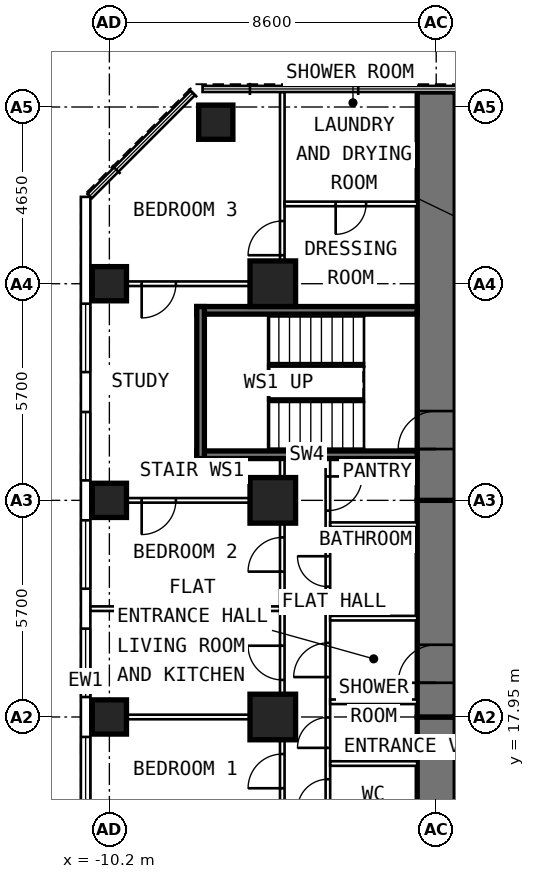
"""IFC4 building model, lengths in metres.
Left out: names, types, materials, properties, quantities, classifications, styles, units other than length and angle.
Written with IfcOpenShell. Run it as: python <this file> out.ifc"""

import sys

from ifc_helpers import new_model, si_unit, direction, frame, frame_2d, origin, origin_2d, place, context, subcontext, project, spatial, rectangle, extrude, element, fill, save


model = new_model("IFC4")
c1 = context("Model", 3, precision=1e-05, world=origin(), true_north=direction((0.0, 1.0)))
c2 = subcontext(c1, "Body", "Model", "MODEL_VIEW")
j1 = project(units=[si_unit("LENGTHUNIT", "METRE"), si_unit("PLANEANGLEUNIT", "RADIAN")], contexts=[c1])
p1 = place(None, origin())
s1 = spatial("IfcSite", under=j1, at=p1, CompositionType="ELEMENT")
p2 = place(p1, origin())
s2 = spatial("IfcBuilding", under=s1, at=p2, CompositionType="ELEMENT")
p3 = place(p2, frame((0.0, 0.0, 95.2)))
s3 = spatial("IfcBuildingStorey", under=s2, at=p3, CompositionType="ELEMENT", Elevation=95.2)
for number, where, z_axis, x_axis in (
    (1, (-10.2, 17.95, 0.0), (0.0, 0.0, 1.0), (0.0, 1.0, 0.0)),
    (2, (-10.2, 23.65, 0.0), (0.0, 0.0, 1.0), (0.0, 1.0, 0.0)),
    (3, (-10.2, 29.35, 0.0), (0.0, 0.0, 1.0), (0.0, 1.0, 0.0)),
    (4, (-7.4, 33.6, 0.0), (0.0, 0.0, 1.0), (0.0, 1.0, 0.0)),
):
    element("IfcColumn", number, at=place(p3, frame(where, z_axis=z_axis, x_axis=x_axis)), inside=s3, PredefinedType="COLUMN", context=c2, shape_type="SweptSolid", body=[
        extrude(rectangle(XDim=0.9, YDim=0.9, at=origin_2d()), origin(), (0.0, 0.0, 1.0), 3.6),
    ])
for number, where, z_axis, x_axis in (
    (5, (-5.9, 17.95, 0.0), (0.0, 0.0, 1.0), (0.0, 1.0, 0.0)),
    (6, (-5.9, 23.65, 0.0), (0.0, 0.0, 1.0), (0.0, 1.0, 0.0)),
    (7, (-5.9, 29.35, 0.0), (0.0, 0.0, 1.0), (0.0, 1.0, 0.0)),
):
    element("IfcColumn", number, at=place(p3, frame(where, z_axis=z_axis, x_axis=x_axis)), inside=s3, PredefinedType="COLUMN", context=c2, shape_type="SweptSolid", body=[
        extrude(rectangle(XDim=1.2, YDim=1.2, at=origin_2d()), origin(), (0.0, 0.0, 1.0), 3.6),
    ])
p4 = place(p3, frame((-1.6, 9.6, 0.0), z_axis=(0.0, 0.0, 1.0), x_axis=(0.0, 1.0, 0.0)))
e8 = element("IfcWall", 8, at=p4, inside=s3, PredefinedType="SHEAR", context=c2, shape_type="SweptSolid", body=[
    extrude(rectangle(XDim=8.35, YDim=1.0, at=frame_2d((4.175, 0.0))), origin(), (0.0, 0.0, 1.0), 3.6),
])
p5 = place(p4, frame((1.3, 0.0, 0.0)))
e9 = element("IfcOpeningElement", 9, at=p5, cuts=e8, PredefinedType="OPENING", context=c2, shape_type="SweptSolid", body=[
    extrude(rectangle(XDim=1.0, YDim=2.1, at=frame_2d((0.5, 1.05))), frame((0.0, 0.512, 0.0), z_axis=(0.0, -1.0, 0.0), x_axis=(1.0, 0.0, 0.0)), (0.0, 0.0, 1.0), 1.024),
])
p6 = place(p3, frame((-1.6, 17.95, 0.0), z_axis=(0.0, 0.0, 1.0), x_axis=(0.0, 1.0, 0.0)))
e10 = element("IfcWall", 10, at=p6, inside=s3, PredefinedType="SHEAR", context=c2, shape_type="SweptSolid", body=[
    extrude(rectangle(XDim=5.7, YDim=1.0, at=frame_2d((2.85, 0.0))), origin(), (0.0, 0.0, 1.0), 3.6),
])
p7 = place(p6, frame((0.9, 0.0, 0.0)))
e11 = element("IfcOpeningElement", 11, at=p7, cuts=e10, PredefinedType="OPENING", context=c2, shape_type="SweptSolid", body=[
    extrude(rectangle(XDim=1.0, YDim=2.1, at=frame_2d((0.5, 1.05))), frame((0.0, 0.512, 0.0), z_axis=(0.0, -1.0, 0.0), x_axis=(1.0, 0.0, 0.0)), (0.0, 0.0, 1.0), 1.024),
])
p8 = place(p3, frame((-1.6, 23.65, 0.0), z_axis=(0.0, 0.0, 1.0), x_axis=(0.0, 1.0, 0.0)))
e12 = element("IfcWall", 12, at=p8, inside=s3, PredefinedType="SHEAR", context=c2, shape_type="SweptSolid", body=[
    extrude(rectangle(XDim=10.745, YDim=1.0, at=frame_2d((5.373, 0.0))), origin(), (0.0, 0.0, 1.0), 3.6),
])
p9 = place(p8, frame((1.35, 0.0, 0.0)))
e13 = element("IfcOpeningElement", 13, at=p9, cuts=e12, PredefinedType="OPENING", context=c2, shape_type="SweptSolid", body=[
    extrude(rectangle(XDim=1.0, YDim=2.1, at=frame_2d((0.5, 1.05))), frame((0.0, 0.512, 0.0), z_axis=(0.0, -1.0, 0.0), x_axis=(1.0, 0.0, 0.0)), (0.0, 0.0, 1.0), 1.024),
])
p10 = place(p3, frame((-10.825, 6.148, 0.0), z_axis=(0.0, 0.0, 1.0), x_axis=(0.0, 1.0, 0.0)))
e14 = element("IfcWall", 14, at=p10, inside=s3, PredefinedType="SOLIDWALL", context=c2, shape_type="SweptSolid", body=[
    extrude(rectangle(XDim=25.487, YDim=0.25, at=frame_2d((12.744, 0.0))), origin(), (0.0, 0.0, 1.0), 3.35),
])
p11 = place(p10, frame((0.927, 0.0, 0.8)))
e15 = element("IfcOpeningElement", 15, at=p11, cuts=e14, PredefinedType="OPENING", context=c2, shape_type="SweptSolid", body=[
    extrude(rectangle(XDim=1.8, YDim=1.8, at=frame_2d((0.9, 0.9))), frame((0.0, 0.137, 0.0), z_axis=(0.0, -1.0, 0.0), x_axis=(1.0, 0.0, 0.0)), (0.0, 0.0, 1.0), 0.274),
])
p12 = place(p10, frame((3.777, 0.0, 0.8)))
e16 = element("IfcOpeningElement", 16, at=p12, cuts=e14, PredefinedType="OPENING", context=c2, shape_type="SweptSolid", body=[
    extrude(rectangle(XDim=1.8, YDim=1.8, at=frame_2d((0.9, 0.9))), frame((0.0, 0.137, 0.0), z_axis=(0.0, -1.0, 0.0), x_axis=(1.0, 0.0, 0.0)), (0.0, 0.0, 1.0), 0.274),
])
p13 = place(p10, frame((6.627, 0.0, 0.8)))
e17 = element("IfcOpeningElement", 17, at=p13, cuts=e14, PredefinedType="OPENING", context=c2, shape_type="SweptSolid", body=[
    extrude(rectangle(XDim=1.8, YDim=1.8, at=frame_2d((0.9, 0.9))), frame((0.0, 0.137, 0.0), z_axis=(0.0, -1.0, 0.0), x_axis=(1.0, 0.0, 0.0)), (0.0, 0.0, 1.0), 0.274),
])
p14 = place(p10, frame((9.477, 0.0, 0.8)))
e18 = element("IfcOpeningElement", 18, at=p14, cuts=e14, PredefinedType="OPENING", context=c2, shape_type="SweptSolid", body=[
    extrude(rectangle(XDim=1.8, YDim=1.8, at=frame_2d((0.9, 0.9))), frame((0.0, 0.137, 0.0), z_axis=(0.0, -1.0, 0.0), x_axis=(1.0, 0.0, 0.0)), (0.0, 0.0, 1.0), 0.274),
])
p15 = place(p10, frame((12.327, 0.0, 0.8)))
e19 = element("IfcOpeningElement", 19, at=p15, cuts=e14, PredefinedType="OPENING", context=c2, shape_type="SweptSolid", body=[
    extrude(rectangle(XDim=1.8, YDim=1.8, at=frame_2d((0.9, 0.9))), frame((0.0, 0.137, 0.0), z_axis=(0.0, -1.0, 0.0), x_axis=(1.0, 0.0, 0.0)), (0.0, 0.0, 1.0), 0.274),
])
p16 = place(p10, frame((15.177, 0.0, 0.8)))
e20 = element("IfcOpeningElement", 20, at=p16, cuts=e14, PredefinedType="OPENING", context=c2, shape_type="SweptSolid", body=[
    extrude(rectangle(XDim=1.8, YDim=1.8, at=frame_2d((0.9, 0.9))), frame((0.0, 0.137, 0.0), z_axis=(0.0, -1.0, 0.0), x_axis=(1.0, 0.0, 0.0)), (0.0, 0.0, 1.0), 0.274),
])
p17 = place(p10, frame((18.027, 0.0, 0.8)))
e21 = element("IfcOpeningElement", 21, at=p17, cuts=e14, PredefinedType="OPENING", context=c2, shape_type="SweptSolid", body=[
    extrude(rectangle(XDim=1.8, YDim=1.8, at=frame_2d((0.9, 0.9))), frame((0.0, 0.137, 0.0), z_axis=(0.0, -1.0, 0.0), x_axis=(1.0, 0.0, 0.0)), (0.0, 0.0, 1.0), 0.274),
])
p18 = place(p10, frame((20.877, 0.0, 0.8)))
e22 = element("IfcOpeningElement", 22, at=p18, cuts=e14, PredefinedType="OPENING", context=c2, shape_type="SweptSolid", body=[
    extrude(rectangle(XDim=1.8, YDim=1.8, at=frame_2d((0.9, 0.9))), frame((0.0, 0.137, 0.0), z_axis=(0.0, -1.0, 0.0), x_axis=(1.0, 0.0, 0.0)), (0.0, 0.0, 1.0), 0.274),
])
p19 = place(p3, frame((-4.45, 15.2, 0.0), z_axis=(0.0, 0.0, 1.0), x_axis=(0.0, 1.0, 0.0)))
e23 = element("IfcWall", 23, at=p19, inside=s3, PredefinedType="PARTITIONING", context=c2, shape_type="SweptSolid", body=[
    extrude(rectangle(XDim=9.55, YDim=0.12, at=frame_2d((4.775, 0.0))), origin(), (0.0, 0.0, 1.0), 3.35),
])
p20 = place(p19, frame((0.312, 0.0, 0.0)))
e24 = element("IfcOpeningElement", 24, at=p20, cuts=e23, PredefinedType="OPENING", context=c2, shape_type="SweptSolid", body=[
    extrude(rectangle(XDim=0.8, YDim=2.1, at=frame_2d((0.4, 1.05))), frame((0.0, 0.072, 0.0), z_axis=(0.0, -1.0, 0.0), x_axis=(1.0, 0.0, 0.0)), (0.0, 0.0, 1.0), 0.144),
])
p21 = place(p19, frame((1.938, 0.0, 0.0)))
e25 = element("IfcOpeningElement", 25, at=p21, cuts=e23, PredefinedType="OPENING", context=c2, shape_type="SweptSolid", body=[
    extrude(rectangle(XDim=0.8, YDim=2.1, at=frame_2d((0.4, 1.05))), frame((0.0, 0.072, 0.0), z_axis=(0.0, -1.0, 0.0), x_axis=(1.0, 0.0, 0.0)), (0.0, 0.0, 1.0), 0.144),
])
p22 = place(p19, frame((3.8, 0.0, 0.0)))
e26 = element("IfcOpeningElement", 26, at=p22, cuts=e23, PredefinedType="OPENING", context=c2, shape_type="SweptSolid", body=[
    extrude(rectangle(XDim=0.9, YDim=2.1, at=frame_2d((0.45, 1.05))), frame((0.0, 0.072, 0.0), z_axis=(0.0, -1.0, 0.0), x_axis=(1.0, 0.0, 0.0)), (0.0, 0.0, 1.0), 0.144),
])
p23 = place(p19, frame((6.18, 0.0, 0.0)))
e27 = element("IfcOpeningElement", 27, at=p23, cuts=e23, PredefinedType="OPENING", context=c2, shape_type="SweptSolid", body=[
    extrude(rectangle(XDim=0.8, YDim=2.1, at=frame_2d((0.4, 1.05))), frame((0.0, 0.072, 0.0), z_axis=(0.0, -1.0, 0.0), x_axis=(1.0, 0.0, 0.0)), (0.0, 0.0, 1.0), 0.144),
])
p24 = place(p19, frame((8.18, 0.0, 0.0)))
e28 = element("IfcOpeningElement", 28, at=p24, cuts=e23, PredefinedType="OPENING", context=c2, shape_type="SweptSolid", body=[
    extrude(rectangle(XDim=0.9, YDim=2.1, at=frame_2d((0.45, 1.05))), frame((0.0, 0.072, 0.0), z_axis=(0.0, -1.0, 0.0), x_axis=(1.0, 0.0, 0.0)), (0.0, 0.0, 1.0), 0.144),
])
p25 = place(p3, frame((-5.65, 15.2, 0.0), z_axis=(0.0, 0.0, 1.0), x_axis=(0.0, 1.0, 0.0)))
e29 = element("IfcWall", 29, at=p25, inside=s3, PredefinedType="PARTITIONING", context=c2, shape_type="SweptSolid", body=[
    extrude(rectangle(XDim=9.55, YDim=0.12, at=frame_2d((4.775, 0.0))), origin(), (0.0, 0.0, 1.0), 3.35),
])
p26 = place(p25, frame((0.875, 0.0, 0.0)))
e30 = element("IfcOpeningElement", 30, at=p26, cuts=e29, PredefinedType="OPENING", context=c2, shape_type="SweptSolid", body=[
    extrude(rectangle(XDim=0.9, YDim=2.1, at=frame_2d((0.45, 1.05))), frame((0.0, 0.072, 0.0), z_axis=(0.0, -1.0, 0.0), x_axis=(1.0, 0.0, 0.0)), (0.0, 0.0, 1.0), 0.144),
])
p27 = place(p25, frame((3.725, 0.0, 0.0)))
e31 = element("IfcOpeningElement", 31, at=p27, cuts=e29, PredefinedType="OPENING", context=c2, shape_type="SweptSolid", body=[
    extrude(rectangle(XDim=0.9, YDim=2.1, at=frame_2d((0.45, 1.05))), frame((0.0, 0.072, 0.0), z_axis=(0.0, -1.0, 0.0), x_axis=(1.0, 0.0, 0.0)), (0.0, 0.0, 1.0), 0.144),
])
p28 = place(p25, frame((6.575, 0.0, 0.0)))
e32 = element("IfcOpeningElement", 32, at=p28, cuts=e29, PredefinedType="OPENING", context=c2, shape_type="SweptSolid", body=[
    extrude(rectangle(XDim=0.9, YDim=2.1, at=frame_2d((0.45, 1.05))), frame((0.0, 0.072, 0.0), z_axis=(0.0, -1.0, 0.0), x_axis=(1.0, 0.0, 0.0)), (0.0, 0.0, 1.0), 0.144),
])
p29 = place(p3, frame((-5.71, 17.95, 0.0), z_axis=(0.0, 0.0, 1.0), x_axis=(-1.0, 0.0, 0.0)))
e33 = element("IfcWall", 33, at=p29, inside=s3, PredefinedType="PARTITIONING", context=c2, shape_type="SweptSolid", body=[
    extrude(rectangle(XDim=4.99, YDim=0.12, at=frame_2d((2.495, 0.0))), origin(), (0.0, 0.0, 1.0), 2.45),
])
p30 = place(p3, frame((-5.71, 20.8, 0.0), z_axis=(0.0, 0.0, 1.0), x_axis=(-1.0, 0.0, 0.0)))
e34 = element("IfcWall", 34, at=p30, inside=s3, PredefinedType="PARTITIONING", context=c2, shape_type="SweptSolid", body=[
    extrude(rectangle(XDim=4.99, YDim=0.12, at=frame_2d((2.495, 0.0))), origin(), (0.0, 0.0, 1.0), 3.35),
])
for number, where, z_axis, x_axis in (
    (35, (-2.1, 16.725, 0.0), (0.0, 0.0, 1.0), (-1.0, 0.0, 0.0)),
    (36, (-2.1, 18.35, 0.0), (0.0, 0.0, 1.0), (-1.0, 0.0, 0.0)),
    (37, (-2.1, 20.55, 0.0), (0.0, 0.0, 1.0), (-1.0, 0.0, 0.0)),
    (38, (-2.1, 23.01, 0.0), (0.0, 0.0, 1.0), (-1.0, 0.0, 0.0)),
):
    element("IfcWall", number, at=place(p3, frame(where, z_axis=z_axis, x_axis=x_axis)), inside=s3, PredefinedType="PARTITIONING", context=c2, shape_type="SweptSolid", body=[
        extrude(rectangle(XDim=2.29, YDim=0.12, at=frame_2d((1.145, 0.0))), origin(), (0.0, 0.0, 1.0), 3.35),
    ])
p31 = place(p3, frame((-5.71, 23.65, 0.0), z_axis=(0.0, 0.0, 1.0), x_axis=(-1.0, 0.0, 0.0)))
e39 = element("IfcWall", 39, at=p31, inside=s3, PredefinedType="PARTITIONING", context=c2, shape_type="SweptSolid", body=[
    extrude(rectangle(XDim=4.99, YDim=0.12, at=frame_2d((2.495, 0.0))), origin(), (0.0, 0.0, 1.0), 2.45),
])
p32 = place(p31, frame((2.74, 0.0, 0.0)))
e40 = element("IfcOpeningElement", 40, at=p32, cuts=e39, PredefinedType="OPENING", context=c2, shape_type="SweptSolid", body=[
    extrude(rectangle(XDim=0.9, YDim=2.1, at=frame_2d((0.45, 1.05))), frame((0.0, 0.072, 0.0), z_axis=(0.0, -1.0, 0.0), x_axis=(1.0, 0.0, 0.0)), (0.0, 0.0, 1.0), 0.144),
])
p33 = place(p3, frame((-5.71, 29.35, 0.0), z_axis=(0.0, 0.0, 1.0), x_axis=(-1.0, 0.0, 0.0)))
e41 = element("IfcWall", 41, at=p33, inside=s3, PredefinedType="PARTITIONING", context=c2, shape_type="SweptSolid", body=[
    extrude(rectangle(XDim=4.99, YDim=0.12, at=frame_2d((2.495, 0.0))), origin(), (0.0, 0.0, 1.0), 2.45),
])
p34 = place(p33, frame((2.74, 0.0, 0.0)))
e42 = element("IfcOpeningElement", 42, at=p34, cuts=e41, PredefinedType="OPENING", context=c2, shape_type="SweptSolid", body=[
    extrude(rectangle(XDim=0.9, YDim=2.1, at=frame_2d((0.45, 1.05))), frame((0.0, 0.072, 0.0), z_axis=(0.0, -1.0, 0.0), x_axis=(1.0, 0.0, 0.0)), (0.0, 0.0, 1.0), 0.144),
])
p35 = place(p3, frame((-5.65, 28.95, 0.0), z_axis=(0.0, 0.0, 1.0), x_axis=(0.0, 1.0, 0.0)))
e43 = element("IfcWall", 43, at=p35, inside=s3, PredefinedType="PARTITIONING", context=c2, shape_type="SweptSolid", body=[
    extrude(rectangle(XDim=5.445, YDim=0.12, at=frame_2d((2.723, 0.0))), origin(), (0.0, 0.0, 1.0), 3.35),
])
p36 = place(p35, frame((1.15, 0.0, 0.0)))
e44 = element("IfcOpeningElement", 44, at=p36, cuts=e43, PredefinedType="OPENING", context=c2, shape_type="SweptSolid", body=[
    extrude(rectangle(XDim=0.9, YDim=2.1, at=frame_2d((0.45, 1.05))), frame((0.0, 0.072, 0.0), z_axis=(0.0, -1.0, 0.0), x_axis=(1.0, 0.0, 0.0)), (0.0, 0.0, 1.0), 0.144),
])
p37 = place(p3, frame((-2.1, 31.45, 0.0), z_axis=(0.0, 0.0, 1.0), x_axis=(-1.0, 0.0, 0.0)))
e45 = element("IfcWall", 45, at=p37, inside=s3, PredefinedType="PARTITIONING", context=c2, shape_type="SweptSolid", body=[
    extrude(rectangle(XDim=3.49, YDim=0.12, at=frame_2d((1.745, 0.0))), origin(), (0.0, 0.0, 1.0), 3.35),
])
p38 = place(p37, frame((1.345, 0.0, 0.0)))
e46 = element("IfcOpeningElement", 46, at=p38, cuts=e45, PredefinedType="OPENING", context=c2, shape_type="SweptSolid", body=[
    extrude(rectangle(XDim=0.8, YDim=2.1, at=frame_2d((0.4, 1.05))), frame((0.0, 0.072, 0.0), z_axis=(0.0, -1.0, 0.0), x_axis=(1.0, 0.0, 0.0)), (0.0, 0.0, 1.0), 0.144),
])
for number, where, z_axis, x_axis in (
    (47, (-2.1, 24.85, 0.0), (0.0, 0.0, 1.0), (-1.0, 0.0, 0.0)),
    (48, (-2.1, 28.65, 0.0), (0.0, 0.0, 1.0), (-1.0, 0.0, 0.0)),
):
    element("IfcWall", number, at=place(p3, frame(where, z_axis=z_axis, x_axis=x_axis)), inside=s3, PredefinedType="SHEAR", context=c2, shape_type="SweptSolid", body=[
        extrude(rectangle(XDim=5.8, YDim=0.2, at=frame_2d((2.9, 0.0))), origin(), (0.0, 0.0, 1.0), 3.33),
    ])
p39 = place(p3, frame((-7.8, 24.75, 0.0), z_axis=(0.0, 0.0, 1.0), x_axis=(0.0, 1.0, 0.0)))
e49 = element("IfcWall", 49, at=p39, inside=s3, PredefinedType="SHEAR", context=c2, shape_type="SweptSolid", body=[
    extrude(rectangle(XDim=4.0, YDim=0.2, at=frame_2d((2.0, 0.0))), origin(), (0.0, 0.0, 1.0), 3.33),
])
p40 = place(p14, origin())
e50 = element("IfcWindow", 50, at=p40, inside=s3, PartitioningType="SINGLE_PANEL", PredefinedType="WINDOW", context=c2, shape_type="SweptSolid", body=[
    extrude(rectangle(XDim=1.8, YDim=1.8, at=frame_2d((0.9, 0.9))), frame((0.0, 0.03, 0.0), z_axis=(0.0, -1.0, 0.0), x_axis=(1.0, 0.0, 0.0)), (0.0, 0.0, 1.0), 0.06),
])
fill(e18, e50)
p41 = place(p15, origin())
e51 = element("IfcWindow", 51, at=p41, inside=s3, PartitioningType="SINGLE_PANEL", PredefinedType="WINDOW", context=c2, shape_type="SweptSolid", body=[
    extrude(rectangle(XDim=1.8, YDim=1.8, at=frame_2d((0.9, 0.9))), frame((0.0, 0.03, 0.0), z_axis=(0.0, -1.0, 0.0), x_axis=(1.0, 0.0, 0.0)), (0.0, 0.0, 1.0), 0.06),
])
fill(e19, e51)
p42 = place(p16, origin())
e52 = element("IfcWindow", 52, at=p42, inside=s3, PartitioningType="SINGLE_PANEL", PredefinedType="WINDOW", context=c2, shape_type="SweptSolid", body=[
    extrude(rectangle(XDim=1.8, YDim=1.8, at=frame_2d((0.9, 0.9))), frame((0.0, 0.03, 0.0), z_axis=(0.0, -1.0, 0.0), x_axis=(1.0, 0.0, 0.0)), (0.0, 0.0, 1.0), 0.06),
])
fill(e20, e52)
p43 = place(p17, origin())
e53 = element("IfcWindow", 53, at=p43, inside=s3, PartitioningType="SINGLE_PANEL", PredefinedType="WINDOW", context=c2, shape_type="SweptSolid", body=[
    extrude(rectangle(XDim=1.8, YDim=1.8, at=frame_2d((0.9, 0.9))), frame((0.0, 0.03, 0.0), z_axis=(0.0, -1.0, 0.0), x_axis=(1.0, 0.0, 0.0)), (0.0, 0.0, 1.0), 0.06),
])
fill(e21, e53)
p44 = place(p18, origin())
e54 = element("IfcWindow", 54, at=p44, inside=s3, PartitioningType="SINGLE_PANEL", PredefinedType="WINDOW", context=c2, shape_type="SweptSolid", body=[
    extrude(rectangle(XDim=1.8, YDim=1.8, at=frame_2d((0.9, 0.9))), frame((0.0, 0.03, 0.0), z_axis=(0.0, -1.0, 0.0), x_axis=(1.0, 0.0, 0.0)), (0.0, 0.0, 1.0), 0.06),
])
fill(e22, e54)
p45 = place(p7, origin())
e55 = element("IfcDoor", 55, at=p45, inside=s3, OperationType="SINGLE_SWING_LEFT", PredefinedType="DOOR", context=c2, shape_type="SweptSolid", body=[
    extrude(rectangle(XDim=1.0, YDim=2.1, at=frame_2d((0.5, 1.05))), frame((0.0, 0.25, 0.0), z_axis=(0.0, -1.0, 0.0), x_axis=(1.0, 0.0, 0.0)), (0.0, 0.0, 1.0), 0.5),
])
fill(e11, e55)
p46 = place(p26, origin())
e56 = element("IfcDoor", 56, at=p46, inside=s3, OperationType="SINGLE_SWING_LEFT", PredefinedType="DOOR", context=c2, shape_type="SweptSolid", body=[
    extrude(rectangle(XDim=0.9, YDim=2.1, at=frame_2d((0.45, 1.05))), frame((0.0, 0.025, 0.0), z_axis=(0.0, -1.0, 0.0), x_axis=(1.0, 0.0, 0.0)), (0.0, 0.0, 1.0), 0.05),
])
fill(e30, e56)
p47 = place(p27, origin())
e57 = element("IfcDoor", 57, at=p47, inside=s3, OperationType="SINGLE_SWING_RIGHT", PredefinedType="DOOR", context=c2, shape_type="SweptSolid", body=[
    extrude(rectangle(XDim=0.9, YDim=2.1, at=frame_2d((0.45, 1.05))), frame((0.0, 0.025, 0.0), z_axis=(0.0, -1.0, 0.0), x_axis=(1.0, 0.0, 0.0)), (0.0, 0.0, 1.0), 0.05),
])
fill(e31, e57)
p48 = place(p28, origin())
e58 = element("IfcDoor", 58, at=p48, inside=s3, OperationType="SINGLE_SWING_LEFT", PredefinedType="DOOR", context=c2, shape_type="SweptSolid", body=[
    extrude(rectangle(XDim=0.9, YDim=2.1, at=frame_2d((0.45, 1.05))), frame((0.0, 0.025, 0.0), z_axis=(0.0, -1.0, 0.0), x_axis=(1.0, 0.0, 0.0)), (0.0, 0.0, 1.0), 0.05),
])
fill(e32, e58)
p49 = place(p20, origin())
e59 = element("IfcDoor", 59, at=p49, inside=s3, OperationType="SINGLE_SWING_LEFT", PredefinedType="DOOR", context=c2, shape_type="SweptSolid", body=[
    extrude(rectangle(XDim=0.8, YDim=2.1, at=frame_2d((0.4, 1.05))), frame((0.0, 0.025, 0.0), z_axis=(0.0, -1.0, 0.0), x_axis=(1.0, 0.0, 0.0)), (0.0, 0.0, 1.0), 0.05),
])
fill(e24, e59)
p50 = place(p21, origin())
e60 = element("IfcDoor", 60, at=p50, inside=s3, OperationType="SINGLE_SWING_LEFT", PredefinedType="DOOR", context=c2, shape_type="SweptSolid", body=[
    extrude(rectangle(XDim=0.8, YDim=2.1, at=frame_2d((0.4, 1.05))), frame((0.0, 0.025, 0.0), z_axis=(0.0, -1.0, 0.0), x_axis=(1.0, 0.0, 0.0)), (0.0, 0.0, 1.0), 0.05),
])
fill(e25, e60)
p51 = place(p22, origin())
e61 = element("IfcDoor", 61, at=p51, inside=s3, OperationType="SINGLE_SWING_LEFT", PredefinedType="DOOR", context=c2, shape_type="SweptSolid", body=[
    extrude(rectangle(XDim=0.9, YDim=2.1, at=frame_2d((0.45, 1.05))), frame((0.0, 0.025, 0.0), z_axis=(0.0, -1.0, 0.0), x_axis=(1.0, 0.0, 0.0)), (0.0, 0.0, 1.0), 0.05),
])
fill(e26, e61)
p52 = place(p23, origin())
e62 = element("IfcDoor", 62, at=p52, inside=s3, OperationType="SINGLE_SWING_RIGHT", PredefinedType="DOOR", context=c2, shape_type="SweptSolid", body=[
    extrude(rectangle(XDim=0.8, YDim=2.1, at=frame_2d((0.4, 1.05))), frame((0.0, 0.025, 0.0), z_axis=(0.0, -1.0, 0.0), x_axis=(1.0, 0.0, 0.0)), (0.0, 0.0, 1.0), 0.05),
])
fill(e27, e62)
p53 = place(p24, frame((0.9, 0.0, 0.0), z_axis=(0.0, 0.0, 1.0), x_axis=(-1.0, 0.0, 0.0)))
e63 = element("IfcDoor", 63, at=p53, inside=s3, OperationType="SINGLE_SWING_LEFT", PredefinedType="DOOR", context=c2, shape_type="SweptSolid", body=[
    extrude(rectangle(XDim=0.9, YDim=2.1, at=frame_2d((0.45, 1.05))), frame((0.0, 0.025, 0.0), z_axis=(0.0, -1.0, 0.0), x_axis=(1.0, 0.0, 0.0)), (0.0, 0.0, 1.0), 0.05),
])
fill(e28, e63)
p54 = place(p34, origin())
e64 = element("IfcDoor", 64, at=p54, inside=s3, OperationType="SINGLE_SWING_RIGHT", PredefinedType="DOOR", context=c2, shape_type="SweptSolid", body=[
    extrude(rectangle(XDim=0.9, YDim=2.1, at=frame_2d((0.45, 1.05))), frame((0.0, 0.025, 0.0), z_axis=(0.0, -1.0, 0.0), x_axis=(1.0, 0.0, 0.0)), (0.0, 0.0, 1.0), 0.05),
])
fill(e42, e64)
p55 = place(p36, origin())
e65 = element("IfcDoor", 65, at=p55, inside=s3, OperationType="SINGLE_SWING_LEFT", PredefinedType="DOOR", context=c2, shape_type="SweptSolid", body=[
    extrude(rectangle(XDim=0.9, YDim=2.1, at=frame_2d((0.45, 1.05))), frame((0.0, 0.025, 0.0), z_axis=(0.0, -1.0, 0.0), x_axis=(1.0, 0.0, 0.0)), (0.0, 0.0, 1.0), 0.05),
])
fill(e44, e65)
p56 = place(p38, origin())
e66 = element("IfcDoor", 66, at=p56, inside=s3, OperationType="SINGLE_SWING_RIGHT", PredefinedType="DOOR", context=c2, shape_type="SweptSolid", body=[
    extrude(rectangle(XDim=0.8, YDim=2.1, at=frame_2d((0.4, 1.05))), frame((0.0, 0.025, 0.0), z_axis=(0.0, -1.0, 0.0), x_axis=(1.0, 0.0, 0.0)), (0.0, 0.0, 1.0), 0.05),
])
fill(e46, e66)
p57 = place(p32, origin())
e67 = element("IfcDoor", 67, at=p57, inside=s3, OperationType="SINGLE_SWING_RIGHT", PredefinedType="DOOR", context=c2, shape_type="SweptSolid", body=[
    extrude(rectangle(XDim=0.9, YDim=2.1, at=frame_2d((0.45, 1.05))), frame((0.0, 0.025, 0.0), z_axis=(0.0, -1.0, 0.0), x_axis=(1.0, 0.0, 0.0)), (0.0, 0.0, 1.0), 0.05),
])
fill(e40, e67)
p58 = place(p9, origin())
e68 = element("IfcDoor", 68, at=p58, inside=s3, OperationType="SINGLE_SWING_LEFT", PredefinedType="DOOR", context=c2, shape_type="SweptSolid", body=[
    extrude(rectangle(XDim=1.0, YDim=2.1, at=frame_2d((0.5, 1.05))), frame((0.0, 0.25, 0.0), z_axis=(0.0, -1.0, 0.0), x_axis=(1.0, 0.0, 0.0)), (0.0, 0.0, 1.0), 0.5),
])
fill(e13, e68)
save(model, sys.argv[1])
